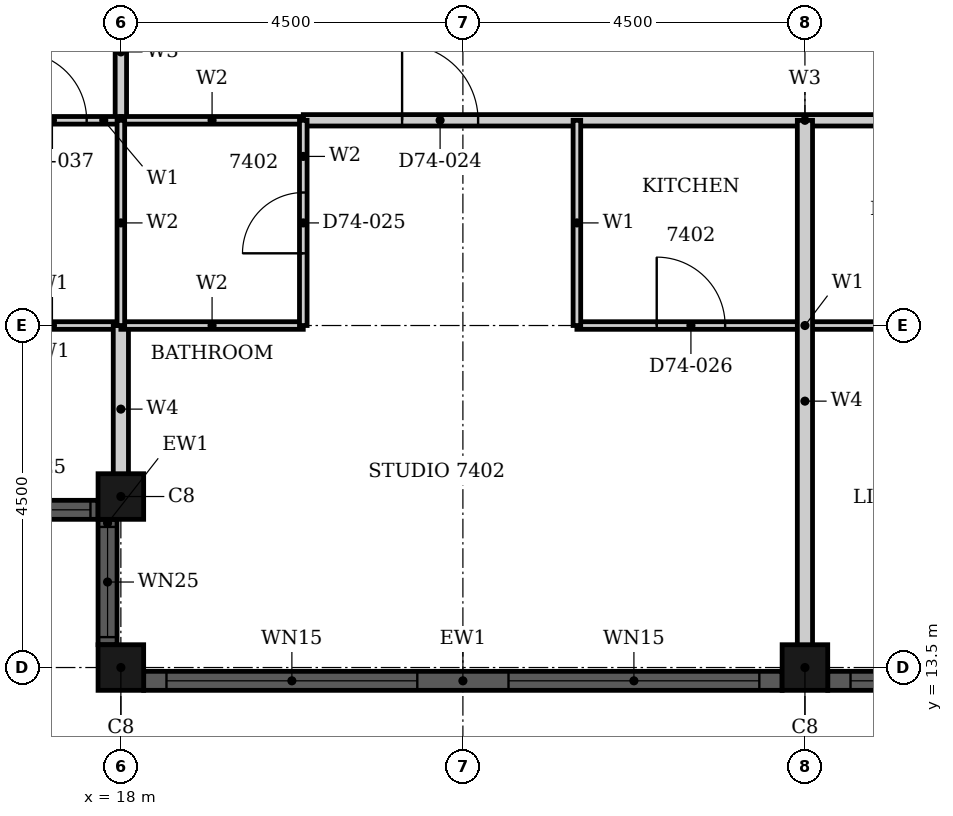
"""IFC4 building model, lengths in metres.
Left out: names, types, materials, properties, quantities, classifications, styles, units other than length and angle.
Written with IfcOpenShell. Run it as: python <this file> out.ifc"""

import sys

from ifc_helpers import new_model, si_unit, direction, frame, frame_2d, origin, origin_2d, place, context, subcontext, project, spatial, rectangle, hollow_rectangle, extrude, element, fill, save


model = new_model("IFC4")
c1 = context("Model", 3, precision=1e-05, world=origin(), true_north=direction((0.0, 1.0)))
c2 = subcontext(c1, "Body", "Model", "MODEL_VIEW")
j1 = project(units=[si_unit("LENGTHUNIT", "METRE"), si_unit("PLANEANGLEUNIT", "RADIAN")], contexts=[c1])
p1 = place(None, origin())
s1 = spatial("IfcSite", under=j1, at=p1, CompositionType="ELEMENT")
p2 = place(p1, origin())
s2 = spatial("IfcBuilding", under=s1, at=p2, CompositionType="ELEMENT")
p3 = place(p2, frame((0.0, 0.0, 290.8)))
s3 = spatial("IfcBuildingStorey", under=s2, at=p3, CompositionType="ELEMENT", Elevation=290.8)
for number, where, z_axis, x_axis in (
    (1, (18.0, 15.75, 0.0), (0.0, 0.0, 1.0), (1.0, 0.0, 0.0)),
    (2, (18.0, 13.5, 0.0), (0.0, 0.0, 1.0), (1.0, 0.0, 0.0)),
    (3, (27.0, 13.5, 0.0), (0.0, 0.0, 1.0), (1.0, 0.0, 0.0)),
):
    element("IfcColumn", number, at=place(p3, frame(where, z_axis=z_axis, x_axis=x_axis)), inside=s3, PredefinedType="COLUMN", context=c2, shape_type="SweptSolid", body=[
        extrude(hollow_rectangle(XDim=0.6, YDim=0.6, WallThickness=0.02, at=origin_2d()), origin(), (0.0, 0.0, 1.0), 3.7),
    ])
p4 = place(p3, frame((16.05, 15.575, 0.0), z_axis=(0.0, 0.0, 1.0), x_axis=(1.0, 0.0, 0.0)))
e4 = element("IfcWall", 4, at=p4, inside=s3, PredefinedType="SOLIDWALL", context=c2, shape_type="SweptSolid", body=[
    extrude(rectangle(XDim=1.65, YDim=0.25, at=frame_2d((0.825, 0.0))), origin(), (0.0, 0.0, 1.0), 3.7),
])
p5 = place(p4, frame((0.1, 0.0, 0.9)))
e5 = element("IfcOpeningElement", 5, at=p5, cuts=e4, PredefinedType="OPENING", context=c2, shape_type="SweptSolid", body=[
    extrude(rectangle(XDim=1.45, YDim=1.85, at=frame_2d((0.725, 0.925))), frame((0.0, 0.135, 0.0), z_axis=(0.0, -1.0, 0.0), x_axis=(1.0, 0.0, 0.0)), (0.0, 0.0, 1.0), 0.27),
])
p6 = place(p3, frame((17.825, 15.45, 0.0), z_axis=(0.0, 0.0, 1.0), x_axis=(0.0, -1.0, 0.0)))
e6 = element("IfcWall", 6, at=p6, inside=s3, PredefinedType="SOLIDWALL", context=c2, shape_type="SweptSolid", body=[
    extrude(rectangle(XDim=1.65, YDim=0.25, at=frame_2d((0.825, 0.0))), origin(), (0.0, 0.0, 1.0), 3.7),
])
p7 = place(p6, frame((0.1, 0.0, 0.9)))
e7 = element("IfcOpeningElement", 7, at=p7, cuts=e6, PredefinedType="OPENING", context=c2, shape_type="SweptSolid", body=[
    extrude(rectangle(XDim=1.45, YDim=1.85, at=frame_2d((0.725, 0.925))), frame((0.0, 0.135, 0.0), z_axis=(0.0, -1.0, 0.0), x_axis=(1.0, 0.0, 0.0)), (0.0, 0.0, 1.0), 0.27),
])
p8 = place(p3, frame((18.3, 13.325, 0.0), z_axis=(0.0, 0.0, 1.0), x_axis=(1.0, 0.0, 0.0)))
e8 = element("IfcWall", 8, at=p8, inside=s3, PredefinedType="SOLIDWALL", context=c2, shape_type="SweptSolid", body=[
    extrude(rectangle(XDim=8.4, YDim=0.25, at=frame_2d((4.2, 0.0))), origin(), (0.0, 0.0, 1.0), 3.7),
])
p9 = place(p8, frame((0.3, 0.0, 0.45)))
e9 = element("IfcOpeningElement", 9, at=p9, cuts=e8, PredefinedType="OPENING", context=c2, shape_type="SweptSolid", body=[
    extrude(rectangle(XDim=3.3, YDim=2.3, at=frame_2d((1.65, 1.15))), frame((0.0, 0.135, 0.0), z_axis=(0.0, -1.0, 0.0), x_axis=(1.0, 0.0, 0.0)), (0.0, 0.0, 1.0), 0.27),
])
p10 = place(p8, frame((4.8, 0.0, 0.45)))
e10 = element("IfcOpeningElement", 10, at=p10, cuts=e8, PredefinedType="OPENING", context=c2, shape_type="SweptSolid", body=[
    extrude(rectangle(XDim=3.3, YDim=2.3, at=frame_2d((1.65, 1.15))), frame((0.0, 0.135, 0.0), z_axis=(0.0, -1.0, 0.0), x_axis=(1.0, 0.0, 0.0)), (0.0, 0.0, 1.0), 0.27),
])
p11 = place(p3, frame((27.3, 13.325, 0.0), z_axis=(0.0, 0.0, 1.0), x_axis=(1.0, 0.0, 0.0)))
e11 = element("IfcWall", 11, at=p11, inside=s3, PredefinedType="SOLIDWALL", context=c2, shape_type="SweptSolid", body=[
    extrude(rectangle(XDim=8.4, YDim=0.25, at=frame_2d((4.2, 0.0))), origin(), (0.0, 0.0, 1.0), 3.7),
])
p12 = place(p11, frame((0.3, 0.0, 0.45)))
e12 = element("IfcOpeningElement", 12, at=p12, cuts=e11, PredefinedType="OPENING", context=c2, shape_type="SweptSolid", body=[
    extrude(rectangle(XDim=3.3, YDim=2.3, at=frame_2d((1.65, 1.15))), frame((0.0, 0.135, 0.0), z_axis=(0.0, -1.0, 0.0), x_axis=(1.0, 0.0, 0.0)), (0.0, 0.0, 1.0), 0.27),
])
p13 = place(p11, frame((4.8, 0.0, 0.45)))
e13 = element("IfcOpeningElement", 13, at=p13, cuts=e11, PredefinedType="OPENING", context=c2, shape_type="SweptSolid", body=[
    extrude(rectangle(XDim=3.3, YDim=2.3, at=frame_2d((1.65, 1.15))), frame((0.0, 0.135, 0.0), z_axis=(0.0, -1.0, 0.0), x_axis=(1.0, 0.0, 0.0)), (0.0, 0.0, 1.0), 0.27),
])
p14 = place(p3, frame((20.4, 20.7, 0.0), z_axis=(0.0, 0.0, 1.0), x_axis=(1.0, 0.0, 0.0)))
e14 = element("IfcWall", 14, at=p14, inside=s3, PredefinedType="PARTITIONING", context=c2, shape_type="SweptSolid", body=[
    extrude(rectangle(XDim=13.2, YDim=0.15, at=frame_2d((6.6, 0.0))), origin(), (0.0, 0.0, 1.0), 3.4),
])
p15 = place(p14, frame((1.3, 0.0, 0.0)))
e15 = element("IfcOpeningElement", 15, at=p15, cuts=e14, PredefinedType="OPENING", context=c2, shape_type="SweptSolid", body=[
    extrude(rectangle(XDim=1.0, YDim=2.2, at=frame_2d((0.5, 1.1))), frame((0.0, 0.085, 0.0), z_axis=(0.0, -1.0, 0.0), x_axis=(1.0, 0.0, 0.0)), (0.0, 0.0, 1.0), 0.17),
])
p16 = place(p14, frame((10.9, 0.0, 0.0)))
e16 = element("IfcOpeningElement", 16, at=p16, cuts=e14, PredefinedType="OPENING", context=c2, shape_type="SweptSolid", body=[
    extrude(rectangle(XDim=1.0, YDim=2.2, at=frame_2d((0.5, 1.1))), frame((0.0, 0.085, 0.0), z_axis=(0.0, -1.0, 0.0), x_axis=(1.0, 0.0, 0.0)), (0.0, 0.0, 1.0), 0.17),
])
p17 = place(p3, frame((18.0, 20.7, 0.0), z_axis=(0.0, 0.0, 1.0), x_axis=(0.0, 1.0, 0.0)))
e17 = element("IfcWall", 17, at=p17, inside=s3, PredefinedType="PARTITIONING", context=c2, shape_type="SweptSolid", body=[
    extrude(rectangle(XDim=1.8, YDim=0.15, at=frame_2d((0.9, 0.0))), origin(), (0.0, 0.0, 1.0), 3.4),
])
p18 = place(p3, frame((24.0, 18.0, 0.0), z_axis=(0.0, 0.0, 1.0), x_axis=(1.0, 0.0, 0.0)))
e18 = element("IfcWall", 18, at=p18, inside=s3, PredefinedType="PARTITIONING", context=c2, shape_type="SweptSolid", body=[
    extrude(rectangle(XDim=6.0, YDim=0.1, at=frame_2d((3.0, 0.0))), origin(), (0.0, 0.0, 1.0), 3.4),
])
p19 = place(p18, frame((1.05, 0.0, 0.0)))
e19 = element("IfcOpeningElement", 19, at=p19, cuts=e18, PredefinedType="OPENING", context=c2, shape_type="SweptSolid", body=[
    extrude(rectangle(XDim=0.9, YDim=2.1, at=frame_2d((0.45, 1.05))), frame((0.0, 0.06, 0.0), z_axis=(0.0, -1.0, 0.0), x_axis=(1.0, 0.0, 0.0)), (0.0, 0.0, 1.0), 0.12),
])
p20 = place(p18, frame((4.05, 0.0, 0.0)))
e20 = element("IfcOpeningElement", 20, at=p20, cuts=e18, PredefinedType="OPENING", context=c2, shape_type="SweptSolid", body=[
    extrude(rectangle(XDim=0.9, YDim=2.1, at=frame_2d((0.45, 1.05))), frame((0.0, 0.06, 0.0), z_axis=(0.0, -1.0, 0.0), x_axis=(1.0, 0.0, 0.0)), (0.0, 0.0, 1.0), 0.12),
])
p21 = place(p3, frame((16.2, 18.0, 0.0), z_axis=(0.0, 0.0, 1.0), x_axis=(1.0, 0.0, 0.0)))
e21 = element("IfcWall", 21, at=p21, inside=s3, PredefinedType="PARTITIONING", context=c2, shape_type="SweptSolid", body=[
    extrude(rectangle(XDim=1.8, YDim=0.1, at=frame_2d((0.9, 0.0))), origin(), (0.0, 0.0, 1.0), 3.4),
])
p22 = place(p3, frame((16.2, 20.7, 0.0), z_axis=(0.0, 0.0, 1.0), x_axis=(1.0, 0.0, 0.0)))
e22 = element("IfcWall", 22, at=p22, inside=s3, PredefinedType="PARTITIONING", context=c2, shape_type="SweptSolid", body=[
    extrude(rectangle(XDim=1.8, YDim=0.1, at=frame_2d((0.9, 0.0))), origin(), (0.0, 0.0, 1.0), 3.4),
])
p23 = place(p22, frame((0.45, 0.0, 0.0)))
e23 = element("IfcOpeningElement", 23, at=p23, cuts=e22, PredefinedType="OPENING", context=c2, shape_type="SweptSolid", body=[
    extrude(rectangle(XDim=0.9, YDim=2.1, at=frame_2d((0.45, 1.05))), frame((0.0, 0.06, 0.0), z_axis=(0.0, -1.0, 0.0), x_axis=(1.0, 0.0, 0.0)), (0.0, 0.0, 1.0), 0.12),
])
p24 = place(p3, frame((24.0, 18.0, 0.0), z_axis=(0.0, 0.0, 1.0), x_axis=(0.0, 1.0, 0.0)))
e24 = element("IfcWall", 24, at=p24, inside=s3, PredefinedType="PARTITIONING", context=c2, shape_type="SweptSolid", body=[
    extrude(rectangle(XDim=2.7, YDim=0.1, at=frame_2d((1.35, 0.0))), origin(), (0.0, 0.0, 1.0), 3.4),
])
p25 = place(p3, frame((18.0, 15.8, 0.0), z_axis=(0.0, 0.0, 1.0), x_axis=(0.0, 1.0, 0.0)))
e25 = element("IfcWall", 25, at=p25, inside=s3, PredefinedType="PARTITIONING", context=c2, shape_type="SweptSolid", body=[
    extrude(rectangle(XDim=2.2, YDim=0.2, at=frame_2d((1.1, 0.0))), origin(), (0.0, 0.0, 1.0), 3.4),
])
p26 = place(p3, frame((27.0, 13.31, 0.0), z_axis=(0.0, 0.0, 1.0), x_axis=(0.0, 1.0, 0.0)))
e26 = element("IfcWall", 26, at=p26, inside=s3, PredefinedType="PARTITIONING", context=c2, shape_type="SweptSolid", body=[
    extrude(rectangle(XDim=7.39, YDim=0.2, at=frame_2d((3.695, 0.0))), origin(), (0.0, 0.0, 1.0), 3.4),
])
for number, where, z_axis, x_axis in (
    (27, (18.0, 18.0, 0.0), (0.0, 0.0, 1.0), (1.0, 0.0, 0.0)),
    (28, (18.0, 20.7, 0.0), (0.0, 0.0, 1.0), (1.0, 0.0, 0.0)),
):
    element("IfcWall", number, at=place(p3, frame(where, z_axis=z_axis, x_axis=x_axis)), inside=s3, PredefinedType="PARTITIONING", context=c2, shape_type="SweptSolid", body=[
        extrude(rectangle(XDim=2.4, YDim=0.1, at=frame_2d((1.2, 0.0))), origin(), (0.0, 0.0, 1.0), 3.4),
    ])
p27 = place(p3, frame((18.0, 18.0, 0.0), z_axis=(0.0, 0.0, 1.0), x_axis=(0.0, 1.0, 0.0)))
e29 = element("IfcWall", 29, at=p27, inside=s3, PredefinedType="PARTITIONING", context=c2, shape_type="SweptSolid", body=[
    extrude(rectangle(XDim=2.7, YDim=0.1, at=frame_2d((1.35, 0.0))), origin(), (0.0, 0.0, 1.0), 3.4),
])
p28 = place(p3, frame((20.4, 18.0, 0.0), z_axis=(0.0, 0.0, 1.0), x_axis=(0.0, 1.0, 0.0)))
e30 = element("IfcWall", 30, at=p28, inside=s3, PredefinedType="PARTITIONING", context=c2, shape_type="SweptSolid", body=[
    extrude(rectangle(XDim=2.7, YDim=0.1, at=frame_2d((1.35, 0.0))), origin(), (0.0, 0.0, 1.0), 3.4),
])
p29 = place(p28, frame((0.95, 0.0, 0.0)))
e31 = element("IfcOpeningElement", 31, at=p29, cuts=e30, PredefinedType="OPENING", context=c2, shape_type="SweptSolid", body=[
    extrude(rectangle(XDim=0.8, YDim=2.1, at=frame_2d((0.4, 1.05))), frame((0.0, 0.06, 0.0), z_axis=(0.0, -1.0, 0.0), x_axis=(1.0, 0.0, 0.0)), (0.0, 0.0, 1.0), 0.12),
])
p30 = place(p5, origin())
e32 = element("IfcWindow", 32, at=p30, inside=s3, PartitioningType="SINGLE_PANEL", PredefinedType="WINDOW", context=c2, shape_type="SweptSolid", body=[
    extrude(rectangle(XDim=1.45, YDim=1.85, at=frame_2d((0.725, 0.925))), frame((0.0, 0.03, 0.0), z_axis=(0.0, -1.0, 0.0), x_axis=(1.0, 0.0, 0.0)), (0.0, 0.0, 1.0), 0.06),
])
fill(e5, e32)
p31 = place(p7, origin())
e33 = element("IfcWindow", 33, at=p31, inside=s3, PartitioningType="SINGLE_PANEL", PredefinedType="WINDOW", context=c2, shape_type="SweptSolid", body=[
    extrude(rectangle(XDim=1.45, YDim=1.85, at=frame_2d((0.725, 0.925))), frame((0.0, 0.03, 0.0), z_axis=(0.0, -1.0, 0.0), x_axis=(1.0, 0.0, 0.0)), (0.0, 0.0, 1.0), 0.06),
])
fill(e7, e33)
p32 = place(p9, origin())
e34 = element("IfcWindow", 34, at=p32, inside=s3, PartitioningType="SINGLE_PANEL", PredefinedType="WINDOW", context=c2, shape_type="SweptSolid", body=[
    extrude(rectangle(XDim=3.3, YDim=2.3, at=frame_2d((1.65, 1.15))), frame((0.0, 0.03, 0.0), z_axis=(0.0, -1.0, 0.0), x_axis=(1.0, 0.0, 0.0)), (0.0, 0.0, 1.0), 0.06),
])
fill(e9, e34)
p33 = place(p10, origin())
e35 = element("IfcWindow", 35, at=p33, inside=s3, PartitioningType="SINGLE_PANEL", PredefinedType="WINDOW", context=c2, shape_type="SweptSolid", body=[
    extrude(rectangle(XDim=3.3, YDim=2.3, at=frame_2d((1.65, 1.15))), frame((0.0, 0.03, 0.0), z_axis=(0.0, -1.0, 0.0), x_axis=(1.0, 0.0, 0.0)), (0.0, 0.0, 1.0), 0.06),
])
fill(e10, e35)
p34 = place(p12, origin())
e36 = element("IfcWindow", 36, at=p34, inside=s3, PartitioningType="SINGLE_PANEL", PredefinedType="WINDOW", context=c2, shape_type="SweptSolid", body=[
    extrude(rectangle(XDim=3.3, YDim=2.3, at=frame_2d((1.65, 1.15))), frame((0.0, 0.03, 0.0), z_axis=(0.0, -1.0, 0.0), x_axis=(1.0, 0.0, 0.0)), (0.0, 0.0, 1.0), 0.06),
])
fill(e12, e36)
p35 = place(p15, origin())
e37 = element("IfcDoor", 37, at=p35, inside=s3, OperationType="SINGLE_SWING_RIGHT", PredefinedType="DOOR", context=c2, shape_type="SweptSolid", body=[
    extrude(rectangle(XDim=1.0, YDim=2.2, at=frame_2d((0.5, 1.1))), frame((0.0, 0.025, 0.0), z_axis=(0.0, -1.0, 0.0), x_axis=(1.0, 0.0, 0.0)), (0.0, 0.0, 1.0), 0.05),
])
fill(e15, e37)
p36 = place(p29, origin())
e38 = element("IfcDoor", 38, at=p36, inside=s3, OperationType="SINGLE_SWING_LEFT", PredefinedType="DOOR", context=c2, shape_type="SweptSolid", body=[
    extrude(rectangle(XDim=0.8, YDim=2.1, at=frame_2d((0.4, 1.05))), frame((0.0, 0.025, 0.0), z_axis=(0.0, -1.0, 0.0), x_axis=(1.0, 0.0, 0.0)), (0.0, 0.0, 1.0), 0.05),
])
fill(e31, e38)
p37 = place(p19, origin())
e39 = element("IfcDoor", 39, at=p37, inside=s3, OperationType="SINGLE_SWING_RIGHT", PredefinedType="DOOR", context=c2, shape_type="SweptSolid", body=[
    extrude(rectangle(XDim=0.9, YDim=2.1, at=frame_2d((0.45, 1.05))), frame((0.0, 0.025, 0.0), z_axis=(0.0, -1.0, 0.0), x_axis=(1.0, 0.0, 0.0)), (0.0, 0.0, 1.0), 0.05),
])
fill(e19, e39)
p38 = place(p23, origin())
e40 = element("IfcDoor", 40, at=p38, inside=s3, OperationType="SINGLE_SWING_RIGHT", PredefinedType="DOOR", context=c2, shape_type="SweptSolid", body=[
    extrude(rectangle(XDim=0.9, YDim=2.1, at=frame_2d((0.45, 1.05))), frame((0.0, 0.025, 0.0), z_axis=(0.0, -1.0, 0.0), x_axis=(1.0, 0.0, 0.0)), (0.0, 0.0, 1.0), 0.05),
])
fill(e23, e40)
save(model, sys.argv[1])
